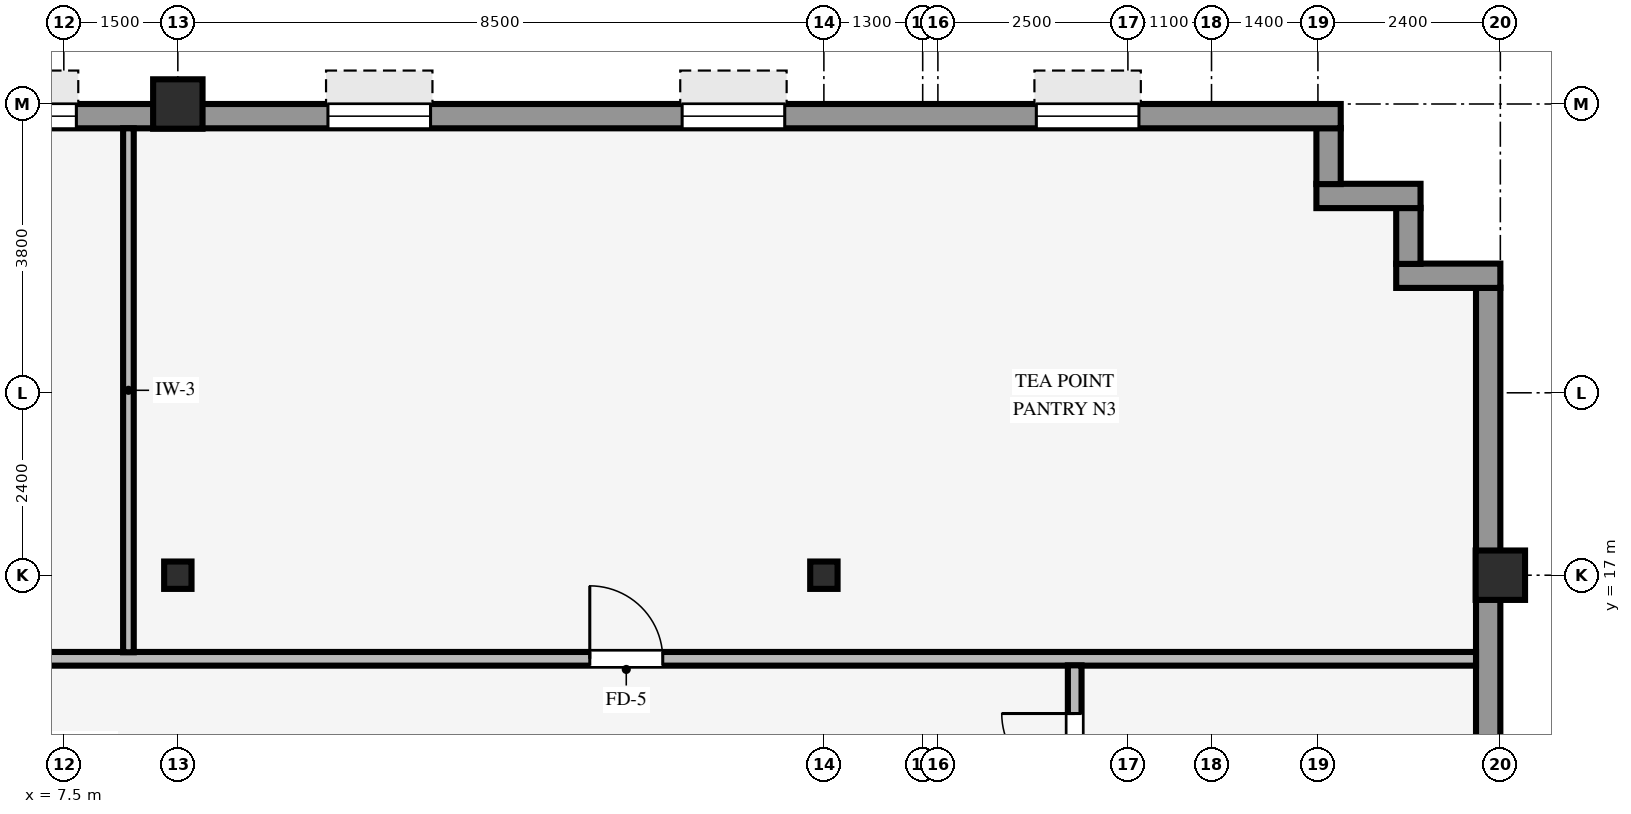
"""IFC4 building model, lengths in metres.
Left out: names, types, materials, properties, quantities, classifications, styles, units other than length and angle.
Written with IfcOpenShell. Run it as: python <this file> out.ifc"""

import sys

from ifc_helpers import new_model, si_unit, direction, frame, frame_2d, origin, origin_2d, place, context, subcontext, project, spatial, rectangle, hollow_rectangle, i_section, extrude, source, transform, mapped, element, fill, save


model = new_model("IFC4")
c1 = context("Model", 3, precision=1e-05, world=origin(), true_north=direction((0.0, 1.0)))
c2 = subcontext(c1, "Body", "Model", "MODEL_VIEW")
j1 = project(units=[si_unit("LENGTHUNIT", "METRE"), si_unit("PLANEANGLEUNIT", "RADIAN")], contexts=[c1])
p1 = place(None, origin())
s1 = spatial("IfcSite", under=j1, at=p1, CompositionType="ELEMENT")
p2 = place(p1, origin())
s2 = spatial("IfcBuilding", under=s1, at=p2, CompositionType="ELEMENT")
p3 = place(p2, frame((0.0, 0.0, 153.05)))
s3 = spatial("IfcBuildingStorey", under=s2, at=p3, CompositionType="ELEMENT", Elevation=153.05)
for number, where, z_axis, x_axis in (
    (1, (26.4, 17.0, 0.0), (0.0, 0.0, 1.0), (1.0, 0.0, 0.0)),
    (2, (9.0, 23.2, 0.0), (0.0, 0.0, 1.0), (1.0, 0.0, 0.0)),
):
    element("IfcColumn", number, at=place(p3, frame(where, z_axis=z_axis, x_axis=x_axis)), inside=s3, PredefinedType="COLUMN", context=c2, shape_type="SweptSolid", body=[
        extrude(hollow_rectangle(XDim=0.65, YDim=0.65, WallThickness=0.04, InnerFilletRadius=0.04, OuterFilletRadius=0.08, at=origin_2d()), origin(), (0.0, 0.0, 1.0), 3.37),
    ])
for number, where, z_axis, x_axis in (
    (3, (9.0, 17.0, 0.0), (0.0, 0.0, 1.0), (1.0, 0.0, 0.0)),
    (4, (17.5, 17.0, 0.0), (0.0, 0.0, 1.0), (1.0, 0.0, 0.0)),
):
    element("IfcColumn", number, at=place(p3, frame(where, z_axis=z_axis, x_axis=x_axis)), inside=s3, PredefinedType="COLUMN", context=c2, shape_type="SweptSolid", body=[
        extrude(i_section(OverallWidth=0.36, OverallDepth=0.36, WebThickness=0.021, FlangeThickness=0.021, FilletRadius=0.018, at=origin_2d()), origin(), (0.0, 0.0, 1.0), 3.37),
    ])
p4 = place(p3, frame((26.24, -20.784, 0.0), z_axis=(0.0, 0.0, 1.0), x_axis=(0.0, 1.0, 0.0)))
e5 = element("IfcWall", 5, at=p4, inside=s3, PredefinedType="STANDARD", context=c2, shape_type="SweptSolid", body=[
    extrude(rectangle(XDim=41.568, YDim=0.32, at=frame_2d((20.784, 0.0))), origin(), (0.0, 0.0, 1.0), 2.705),
])
p5 = place(p4, frame((7.369, 0.0, 0.8)))
e6 = element("IfcOpeningElement", 6, at=p5, cuts=e5, PredefinedType="OPENING", context=c2, shape_type="SweptSolid", body=[
    extrude(rectangle(XDim=2.1, YDim=1.56, at=frame_2d((1.05, 0.78))), frame((0.0, 0.17, 0.0), z_axis=(0.0, -1.0, 0.0), x_axis=(1.0, 0.0, 0.0)), (0.0, 0.0, 1.0), 0.34),
])
p6 = place(p4, frame((12.315, 0.0, 0.8)))
e7 = element("IfcOpeningElement", 7, at=p6, cuts=e5, PredefinedType="OPENING", context=c2, shape_type="SweptSolid", body=[
    extrude(rectangle(XDim=2.1, YDim=1.56, at=frame_2d((1.05, 0.78))), frame((0.0, 0.17, 0.0), z_axis=(0.0, -1.0, 0.0), x_axis=(1.0, 0.0, 0.0)), (0.0, 0.0, 1.0), 0.34),
])
p7 = place(p4, frame((17.261, 0.0, 0.8)))
e8 = element("IfcOpeningElement", 8, at=p7, cuts=e5, PredefinedType="OPENING", context=c2, shape_type="SweptSolid", body=[
    extrude(rectangle(XDim=2.1, YDim=1.56, at=frame_2d((1.05, 0.78))), frame((0.0, 0.17, 0.0), z_axis=(0.0, -1.0, 0.0), x_axis=(1.0, 0.0, 0.0)), (0.0, 0.0, 1.0), 0.34),
])
p8 = place(p4, frame((22.207, 0.0, 0.8)))
e9 = element("IfcOpeningElement", 9, at=p8, cuts=e5, PredefinedType="OPENING", context=c2, shape_type="SweptSolid", body=[
    extrude(rectangle(XDim=2.1, YDim=1.56, at=frame_2d((1.05, 0.78))), frame((0.0, 0.17, 0.0), z_axis=(0.0, -1.0, 0.0), x_axis=(1.0, 0.0, 0.0)), (0.0, 0.0, 1.0), 0.34),
])
p9 = place(p4, frame((27.153, 0.0, 0.8)))
e10 = element("IfcOpeningElement", 10, at=p9, cuts=e5, PredefinedType="OPENING", context=c2, shape_type="SweptSolid", body=[
    extrude(rectangle(XDim=2.1, YDim=1.56, at=frame_2d((1.05, 0.78))), frame((0.0, 0.17, 0.0), z_axis=(0.0, -1.0, 0.0), x_axis=(1.0, 0.0, 0.0)), (0.0, 0.0, 1.0), 0.34),
])
p10 = place(p4, frame((32.099, 0.0, 0.8)))
e11 = element("IfcOpeningElement", 11, at=p10, cuts=e5, PredefinedType="OPENING", context=c2, shape_type="SweptSolid", body=[
    extrude(rectangle(XDim=2.1, YDim=1.56, at=frame_2d((1.05, 0.78))), frame((0.0, 0.17, 0.0), z_axis=(0.0, -1.0, 0.0), x_axis=(1.0, 0.0, 0.0)), (0.0, 0.0, 1.0), 0.34),
])
p11 = place(p3, frame((25.03, 20.94, 0.0), z_axis=(0.0, 0.0, 1.0), x_axis=(1.0, 0.0, 0.0)))
e12 = element("IfcWall", 12, at=p11, inside=s3, PredefinedType="STANDARD", context=c2, shape_type="SweptSolid", body=[
    extrude(rectangle(XDim=1.37, YDim=0.32, at=frame_2d((0.685, 0.0))), origin(), (0.0, 0.0, 1.0), 3.36),
])
p12 = place(p3, frame((25.19, 21.096, 0.0), z_axis=(0.0, 0.0, 1.0), x_axis=(0.0, 1.0, 0.0)))
e13 = element("IfcWall", 13, at=p12, inside=s3, PredefinedType="STANDARD", context=c2, shape_type="SweptSolid", body=[
    extrude(rectangle(XDim=0.738, YDim=0.32, at=frame_2d((0.369, 0.0))), origin(), (0.0, 0.0, 1.0), 3.36),
])
p13 = place(p3, frame((23.98, 21.99, 0.0), z_axis=(0.0, 0.0, 1.0), x_axis=(1.0, 0.0, 0.0)))
e14 = element("IfcWall", 14, at=p13, inside=s3, PredefinedType="STANDARD", context=c2, shape_type="SweptSolid", body=[
    extrude(rectangle(XDim=1.37, YDim=0.32, at=frame_2d((0.685, 0.0))), origin(), (0.0, 0.0, 1.0), 3.36),
])
p14 = place(p3, frame((24.14, 22.146, 0.0), z_axis=(0.0, 0.0, 1.0), x_axis=(0.0, 1.0, 0.0)))
e15 = element("IfcWall", 15, at=p14, inside=s3, PredefinedType="STANDARD", context=c2, shape_type="SweptSolid", body=[
    extrude(rectangle(XDim=0.738, YDim=0.32, at=frame_2d((0.369, 0.0))), origin(), (0.0, 0.0, 1.0), 3.36),
])
p15 = place(p3, frame((-24.3, 23.04, 0.0), z_axis=(0.0, 0.0, 1.0), x_axis=(1.0, 0.0, 0.0)))
e16 = element("IfcWall", 16, at=p15, inside=s3, PredefinedType="STANDARD", context=c2, shape_type="SweptSolid", body=[
    extrude(rectangle(XDim=48.6, YDim=0.32, at=frame_2d((24.3, 0.0))), origin(), (0.0, 0.0, 1.0), 2.705),
])
p16 = place(p15, frame((2.655, 0.0, 0.8)))
e17 = element("IfcOpeningElement", 17, at=p16, cuts=e16, PredefinedType="OPENING", context=c2, shape_type="SweptSolid", body=[
    extrude(rectangle(XDim=1.35, YDim=1.56, at=frame_2d((0.675, 0.78))), frame((0.0, 0.17, 0.0), z_axis=(0.0, -1.0, 0.0), x_axis=(1.0, 0.0, 0.0)), (0.0, 0.0, 1.0), 0.34),
])
p17 = place(p15, frame((7.315, 0.0, 0.8)))
e18 = element("IfcOpeningElement", 18, at=p17, cuts=e16, PredefinedType="OPENING", context=c2, shape_type="SweptSolid", body=[
    extrude(rectangle(XDim=1.35, YDim=1.56, at=frame_2d((0.675, 0.78))), frame((0.0, 0.17, 0.0), z_axis=(0.0, -1.0, 0.0), x_axis=(1.0, 0.0, 0.0)), (0.0, 0.0, 1.0), 0.34),
])
p18 = place(p15, frame((11.975, 0.0, 0.8)))
e19 = element("IfcOpeningElement", 19, at=p18, cuts=e16, PredefinedType="OPENING", context=c2, shape_type="SweptSolid", body=[
    extrude(rectangle(XDim=1.35, YDim=1.56, at=frame_2d((0.675, 0.78))), frame((0.0, 0.17, 0.0), z_axis=(0.0, -1.0, 0.0), x_axis=(1.0, 0.0, 0.0)), (0.0, 0.0, 1.0), 0.34),
])
p19 = place(p15, frame((16.185, 0.0, 0.8)))
e20 = element("IfcOpeningElement", 20, at=p19, cuts=e16, PredefinedType="OPENING", context=c2, shape_type="SweptSolid", body=[
    extrude(rectangle(XDim=1.35, YDim=1.56, at=frame_2d((0.675, 0.78))), frame((0.0, 0.17, 0.0), z_axis=(0.0, -1.0, 0.0), x_axis=(1.0, 0.0, 0.0)), (0.0, 0.0, 1.0), 0.34),
])
p20 = place(p15, frame((21.295, 0.0, 0.8)))
e21 = element("IfcOpeningElement", 21, at=p20, cuts=e16, PredefinedType="OPENING", context=c2, shape_type="SweptSolid", body=[
    extrude(rectangle(XDim=1.35, YDim=1.56, at=frame_2d((0.675, 0.78))), frame((0.0, 0.17, 0.0), z_axis=(0.0, -1.0, 0.0), x_axis=(1.0, 0.0, 0.0)), (0.0, 0.0, 1.0), 0.34),
])
p21 = place(p15, frame((25.955, 0.0, 0.8)))
e22 = element("IfcOpeningElement", 22, at=p21, cuts=e16, PredefinedType="OPENING", context=c2, shape_type="SweptSolid", body=[
    extrude(rectangle(XDim=1.35, YDim=1.56, at=frame_2d((0.675, 0.78))), frame((0.0, 0.17, 0.0), z_axis=(0.0, -1.0, 0.0), x_axis=(1.0, 0.0, 0.0)), (0.0, 0.0, 1.0), 0.34),
])
p22 = place(p15, frame((30.615, 0.0, 0.8)))
e23 = element("IfcOpeningElement", 23, at=p22, cuts=e16, PredefinedType="OPENING", context=c2, shape_type="SweptSolid", body=[
    extrude(rectangle(XDim=1.35, YDim=1.56, at=frame_2d((0.675, 0.78))), frame((0.0, 0.17, 0.0), z_axis=(0.0, -1.0, 0.0), x_axis=(1.0, 0.0, 0.0)), (0.0, 0.0, 1.0), 0.34),
])
p23 = place(p15, frame((35.275, 0.0, 0.8)))
e24 = element("IfcOpeningElement", 24, at=p23, cuts=e16, PredefinedType="OPENING", context=c2, shape_type="SweptSolid", body=[
    extrude(rectangle(XDim=1.35, YDim=1.56, at=frame_2d((0.675, 0.78))), frame((0.0, 0.17, 0.0), z_axis=(0.0, -1.0, 0.0), x_axis=(1.0, 0.0, 0.0)), (0.0, 0.0, 1.0), 0.34),
])
p24 = place(p15, frame((39.935, 0.0, 0.8)))
e25 = element("IfcOpeningElement", 25, at=p24, cuts=e16, PredefinedType="OPENING", context=c2, shape_type="SweptSolid", body=[
    extrude(rectangle(XDim=1.35, YDim=1.56, at=frame_2d((0.675, 0.78))), frame((0.0, 0.17, 0.0), z_axis=(0.0, -1.0, 0.0), x_axis=(1.0, 0.0, 0.0)), (0.0, 0.0, 1.0), 0.34),
])
p25 = place(p15, frame((44.595, 0.0, 0.8)))
e26 = element("IfcOpeningElement", 26, at=p25, cuts=e16, PredefinedType="OPENING", context=c2, shape_type="SweptSolid", body=[
    extrude(rectangle(XDim=1.35, YDim=1.56, at=frame_2d((0.675, 0.78))), frame((0.0, 0.17, 0.0), z_axis=(0.0, -1.0, 0.0), x_axis=(1.0, 0.0, 0.0)), (0.0, 0.0, 1.0), 0.34),
])
p26 = place(p3, frame((-26.08, 15.9, 0.0), z_axis=(0.0, 0.0, 1.0), x_axis=(1.0, 0.0, 0.0)))
e27 = element("IfcWall", 27, at=p26, inside=s3, PredefinedType="PARTITIONING", context=c2, shape_type="SweptSolid", body=[
    extrude(rectangle(XDim=52.16, YDim=0.18, at=frame_2d((26.08, 0.0))), origin(), (0.0, 0.0, 1.0), 3.36),
])
p27 = place(p26, frame((26.72, 0.0, 0.0)))
e28 = element("IfcOpeningElement", 28, at=p27, cuts=e27, PredefinedType="OPENING", context=c2, shape_type="SweptSolid", body=[
    extrude(rectangle(XDim=0.96, YDim=2.1, at=frame_2d((0.48, 1.05))), frame((0.0, 0.1, 0.0), z_axis=(0.0, -1.0, 0.0), x_axis=(1.0, 0.0, 0.0)), (0.0, 0.0, 1.0), 0.2),
])
p28 = place(p26, frame((40.5, 0.0, 0.0)))
e29 = element("IfcOpeningElement", 29, at=p28, cuts=e27, PredefinedType="OPENING", context=c2, shape_type="SweptSolid", body=[
    extrude(rectangle(XDim=0.96, YDim=2.1, at=frame_2d((0.48, 1.05))), frame((0.0, 0.1, 0.0), z_axis=(0.0, -1.0, 0.0), x_axis=(1.0, 0.0, 0.0)), (0.0, 0.0, 1.0), 0.2),
])
p29 = place(p26, frame((13.61, 0.0, 0.0)))
e30 = element("IfcOpeningElement", 30, at=p29, cuts=e27, PredefinedType="OPENING", context=c2, shape_type="SweptSolid", body=[
    extrude(rectangle(XDim=0.96, YDim=2.1, at=frame_2d((0.48, 1.05))), frame((0.0, 0.1, 0.0), z_axis=(0.0, -1.0, 0.0), x_axis=(1.0, 0.0, 0.0)), (0.0, 0.0, 1.0), 0.2),
])
p30 = place(p3, frame((8.35, 15.986, 0.0), z_axis=(0.0, 0.0, 1.0), x_axis=(0.0, 1.0, 0.0)))
e31 = element("IfcWall", 31, at=p30, inside=s3, PredefinedType="PARTITIONING", context=c2, shape_type="SweptSolid", body=[
    extrude(rectangle(XDim=6.894, YDim=0.14, at=frame_2d((3.447, 0.0))), origin(), (0.0, 0.0, 1.0), 3.36),
])
p31 = place(p3, frame((20.8, 13.586, 0.0), z_axis=(0.0, 0.0, 1.0), x_axis=(0.0, 1.0, 0.0)))
e32 = element("IfcWall", 32, at=p31, inside=s3, PredefinedType="PARTITIONING", context=c2, shape_type="SweptSolid", body=[
    extrude(rectangle(XDim=2.228, YDim=0.18, at=frame_2d((1.114, 0.0))), origin(), (0.0, 0.0, 1.0), 3.36),
])
p32 = place(p31, frame((0.634, 0.0, 0.0)))
e33 = element("IfcOpeningElement", 33, at=p32, cuts=e32, PredefinedType="OPENING", context=c2, shape_type="SweptSolid", body=[
    extrude(rectangle(XDim=0.96, YDim=2.1, at=frame_2d((0.48, 1.05))), frame((0.0, 0.1, 0.0), z_axis=(0.0, -1.0, 0.0), x_axis=(1.0, 0.0, 0.0)), (0.0, 0.0, 1.0), 0.2),
])
m1 = source(origin(), c2, "Body", "SweptSolid", [
    extrude(rectangle(XDim=1.35, YDim=1.56, at=frame_2d((0.675, 0.78))), frame((0.0, 0.03, 0.0), z_axis=(0.0, -1.0, 0.0), x_axis=(1.0, 0.0, 0.0)), (0.0, 0.0, 1.0), 0.06),
])
p33 = place(p22, origin())
e34 = element("IfcWindow", 34, at=p33, inside=s3, PartitioningType="SINGLE_PANEL", PredefinedType="WINDOW", context=c2, shape_type="MappedRepresentation", body=[
    mapped(m1, transform((0.0, 0.0, 0.0), scale=1.0)),
])
fill(e23, e34)
p34 = place(p23, origin())
e35 = element("IfcWindow", 35, at=p34, inside=s3, PartitioningType="SINGLE_PANEL", PredefinedType="WINDOW", context=c2, shape_type="MappedRepresentation", body=[
    mapped(m1, transform((0.0, 0.0, 0.0), scale=1.0)),
])
fill(e24, e35)
p35 = place(p24, origin())
e36 = element("IfcWindow", 36, at=p35, inside=s3, PartitioningType="SINGLE_PANEL", PredefinedType="WINDOW", context=c2, shape_type="MappedRepresentation", body=[
    mapped(m1, transform((0.0, 0.0, 0.0), scale=1.0)),
])
fill(e25, e36)
p36 = place(p25, origin())
e37 = element("IfcWindow", 37, at=p36, inside=s3, PartitioningType="SINGLE_PANEL", PredefinedType="WINDOW", context=c2, shape_type="MappedRepresentation", body=[
    mapped(m1, transform((0.0, 0.0, 0.0), scale=1.0)),
])
fill(e26, e37)
m2 = source(origin(), c2, "Body", "SweptSolid", [
    extrude(rectangle(XDim=0.96, YDim=2.1, at=frame_2d((0.48, 1.05))), frame((0.0, 0.025, 0.0), z_axis=(0.0, -1.0, 0.0), x_axis=(1.0, 0.0, 0.0)), (0.0, 0.0, 1.0), 0.05),
])
p37 = place(p28, origin())
e38 = element("IfcDoor", 38, at=p37, inside=s3, OperationType="SINGLE_SWING_LEFT", PredefinedType="DOOR", context=c2, shape_type="MappedRepresentation", body=[
    mapped(m2, transform((0.0, 0.0, 0.0), scale=1.0)),
])
fill(e29, e38)
p38 = place(p32, origin())
e39 = element("IfcDoor", 39, at=p38, inside=s3, OperationType="SINGLE_SWING_RIGHT", PredefinedType="DOOR", context=c2, shape_type="MappedRepresentation", body=[
    mapped(m2, transform((0.0, 0.0, 0.0), scale=1.0)),
])
fill(e33, e39)
save(model, sys.argv[1])
